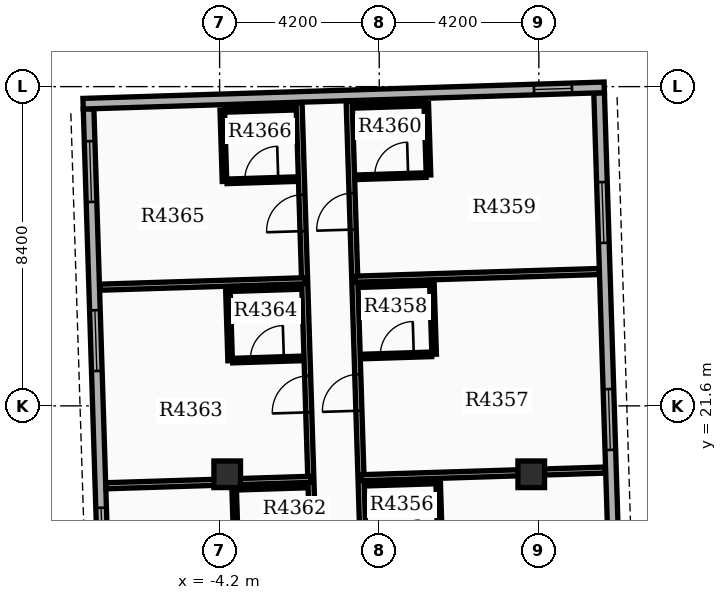
"""IFC4 building model, lengths in metres.
Left out: names, types, materials, properties, quantities, classifications, styles, units other than length and angle.
Written with IfcOpenShell. Run it as: python <this file> out.ifc"""

import sys

from ifc_helpers import new_model, si_unit, direction, frame, frame_2d, origin, origin_2d, place, context, subcontext, project, spatial, rectangle, extrude, element, fill, save


model = new_model("IFC4")
c1 = context("Model", 3, precision=1e-05, world=origin(), true_north=direction((0.0, 1.0)))
c2 = subcontext(c1, "Body", "Model", "MODEL_VIEW")
j1 = project(units=[si_unit("LENGTHUNIT", "METRE"), si_unit("PLANEANGLEUNIT", "RADIAN")], contexts=[c1])
p1 = place(None, origin())
s1 = spatial("IfcSite", under=j1, at=p1, CompositionType="ELEMENT")
p2 = place(p1, origin())
s2 = spatial("IfcBuilding", under=s1, at=p2, CompositionType="ELEMENT")
p3 = place(p2, frame((0.0, 0.0, 273.3)))
s3 = spatial("IfcBuildingStorey", under=s2, at=p3, CompositionType="ELEMENT", Elevation=273.3)
for number, where, z_axis, x_axis in (
    (1, (-4.0, 19.8, 0.0), (0.0, 0.0, 1.0), (1.0, 0.0, 0.0)),
    (2, (4.0, 19.8, 0.0), (0.0, 0.0, 1.0), (1.0, 0.0, 0.0)),
):
    element("IfcColumn", number, at=place(p3, frame(where, z_axis=z_axis, x_axis=x_axis)), inside=s3, PredefinedType="COLUMN", context=c2, shape_type="SweptSolid", body=[
        extrude(rectangle(XDim=0.7, YDim=0.7, at=origin_2d()), origin(), (0.0, 0.0, 1.0), 3.9),
    ])
p4 = place(p3, frame((6.247, 15.144, 0.0), z_axis=(0.0, 0.0, 1.0), x_axis=(-0.031406376864, 0.999506698073, 0.0)))
e3 = element("IfcWall", 3, at=p4, inside=s3, PredefinedType="STANDARD", context=c2, shape_type="SweptSolid", body=[
    extrude(rectangle(XDim=14.7, YDim=0.28, at=frame_2d((7.35, 0.0))), origin(), (0.0, 0.0, 1.0), 3.18),
])
p5 = place(p4, frame((0.85, 0.0, 0.8)))
e4 = element("IfcOpeningElement", 4, at=p5, cuts=e3, PredefinedType="OPENING", context=c2, shape_type="SweptSolid", body=[
    extrude(rectangle(XDim=1.6, YDim=1.7, at=frame_2d((0.8, 0.85))), frame((0.0, 0.15, 0.0), z_axis=(0.0, -1.0, 0.0), x_axis=(1.0, 0.0, 0.0)), (0.0, 0.0, 1.0), 0.3),
])
p6 = place(p4, frame((5.3, 0.0, 0.8)))
e5 = element("IfcOpeningElement", 5, at=p6, cuts=e3, PredefinedType="OPENING", context=c2, shape_type="SweptSolid", body=[
    extrude(rectangle(XDim=1.6, YDim=1.7, at=frame_2d((0.8, 0.85))), frame((0.0, 0.15, 0.0), z_axis=(0.0, -1.0, 0.0), x_axis=(1.0, 0.0, 0.0)), (0.0, 0.0, 1.0), 0.3),
])
p7 = place(p4, frame((10.75, 0.0, 0.8)))
e6 = element("IfcOpeningElement", 6, at=p7, cuts=e3, PredefinedType="OPENING", context=c2, shape_type="SweptSolid", body=[
    extrude(rectangle(XDim=1.6, YDim=1.7, at=frame_2d((0.8, 0.85))), frame((0.0, 0.15, 0.0), z_axis=(0.0, -1.0, 0.0), x_axis=(1.0, 0.0, 0.0)), (0.0, 0.0, 1.0), 0.3),
])
p8 = place(p3, frame((-7.648, 29.414, 0.0), z_axis=(0.0, 0.0, 1.0), x_axis=(0.031405855522, -0.999506714454, 0.0)))
e7 = element("IfcWall", 7, at=p8, inside=s3, PredefinedType="STANDARD", context=c2, shape_type="SweptSolid", body=[
    extrude(rectangle(XDim=14.7, YDim=0.28, at=frame_2d((7.35, 0.0))), origin(), (0.0, 0.0, 1.0), 3.18),
])
p9 = place(p8, frame((0.85, 0.0, 0.8)))
e8 = element("IfcOpeningElement", 8, at=p9, cuts=e7, PredefinedType="OPENING", context=c2, shape_type="SweptSolid", body=[
    extrude(rectangle(XDim=1.6, YDim=1.7, at=frame_2d((0.8, 0.85))), frame((0.0, 0.15, 0.0), z_axis=(0.0, -1.0, 0.0), x_axis=(1.0, 0.0, 0.0)), (0.0, 0.0, 1.0), 0.3),
])
p10 = place(p8, frame((5.3, 0.0, 0.8)))
e9 = element("IfcOpeningElement", 9, at=p10, cuts=e7, PredefinedType="OPENING", context=c2, shape_type="SweptSolid", body=[
    extrude(rectangle(XDim=1.6, YDim=1.7, at=frame_2d((0.8, 0.85))), frame((0.0, 0.15, 0.0), z_axis=(0.0, -1.0, 0.0), x_axis=(1.0, 0.0, 0.0)), (0.0, 0.0, 1.0), 0.3),
])
p11 = place(p8, frame((10.5, 0.0, 0.8)))
e10 = element("IfcOpeningElement", 10, at=p11, cuts=e7, PredefinedType="OPENING", context=c2, shape_type="SweptSolid", body=[
    extrude(rectangle(XDim=1.6, YDim=1.7, at=frame_2d((0.8, 0.85))), frame((0.0, 0.15, 0.0), z_axis=(0.0, -1.0, 0.0), x_axis=(1.0, 0.0, 0.0)), (0.0, 0.0, 1.0), 0.3),
])
p12 = place(p3, frame((5.921, 29.981, 0.0), z_axis=(0.0, 0.0, 1.0), x_axis=(-0.999506662003, -0.031407524763, 0.0)))
e11 = element("IfcWall", 11, at=p12, inside=s3, PredefinedType="STANDARD", context=c2, shape_type="SweptSolid", body=[
    extrude(rectangle(XDim=13.72, YDim=0.28, at=frame_2d((6.86, 0.0))), origin(), (0.0, 0.0, 1.0), 3.18),
])
p13 = place(p12, frame((0.85, 0.0, 0.85)))
e12 = element("IfcOpeningElement", 12, at=p13, cuts=e11, PredefinedType="OPENING", context=c2, shape_type="SweptSolid", body=[
    extrude(rectangle(XDim=1.0, YDim=1.5, at=frame_2d((0.5, 0.75))), frame((0.0, 0.15, 0.0), z_axis=(0.0, -1.0, 0.0), x_axis=(1.0, 0.0, 0.0)), (0.0, 0.0, 1.0), 0.3),
])
p14 = place(p3, frame((-0.319, 14.617, 0.0), z_axis=(0.0, 0.0, 1.0), x_axis=(-0.03142007044, 0.999506267701, 0.0)))
e13 = element("IfcWall", 13, at=p14, inside=s3, PredefinedType="PARTITIONING", context=c2, shape_type="SweptSolid", body=[
    extrude(rectangle(XDim=15.012, YDim=0.16, at=frame_2d((7.506, 0.0))), origin(), (0.0, 0.0, 1.0), 3.17),
])
p15 = place(p14, frame((1.122, 0.0, 0.0)))
e14 = element("IfcOpeningElement", 14, at=p15, cuts=e13, PredefinedType="OPENING", context=c2, shape_type="SweptSolid", body=[
    extrude(rectangle(XDim=0.96, YDim=2.15, at=frame_2d((0.48, 1.075))), frame((0.0, 0.09, 0.0), z_axis=(0.0, -1.0, 0.0), x_axis=(1.0, 0.0, 0.0)), (0.0, 0.0, 1.0), 0.18),
])
p16 = place(p14, frame((6.858, 0.0, 0.0)))
e15 = element("IfcOpeningElement", 15, at=p16, cuts=e13, PredefinedType="OPENING", context=c2, shape_type="SweptSolid", body=[
    extrude(rectangle(XDim=0.96, YDim=2.15, at=frame_2d((0.48, 1.075))), frame((0.0, 0.09, 0.0), z_axis=(0.0, -1.0, 0.0), x_axis=(1.0, 0.0, 0.0)), (0.0, 0.0, 1.0), 0.18),
])
p17 = place(p14, frame((11.628, 0.0, 0.0)))
e16 = element("IfcOpeningElement", 16, at=p17, cuts=e13, PredefinedType="OPENING", context=c2, shape_type="SweptSolid", body=[
    extrude(rectangle(XDim=0.96, YDim=2.15, at=frame_2d((0.48, 1.075))), frame((0.0, 0.09, 0.0), z_axis=(0.0, -1.0, 0.0), x_axis=(1.0, 0.0, 0.0)), (0.0, 0.0, 1.0), 0.18),
])
p18 = place(p3, frame((-0.479, 19.709, 0.0), z_axis=(0.0, 0.0, 1.0), x_axis=(0.999507175611, 0.031391175537, 0.0)))
e17 = element("IfcWall", 17, at=p18, inside=s3, PredefinedType="PARTITIONING", context=c2, shape_type="SweptSolid", body=[
    extrude(rectangle(XDim=6.432, YDim=0.16, at=frame_2d((3.216, 0.0))), origin(), (0.0, 0.0, 1.0), 3.17),
])
p19 = place(p3, frame((-0.334, 19.553, 0.0), z_axis=(0.0, 0.0, 1.0), x_axis=(0.999503004171, 0.03152371574, 0.0)))
e18 = element("IfcWall", 18, at=p19, inside=s3, PredefinedType="PARTITIONING", context=c2, shape_type="SweptSolid", body=[
    extrude(rectangle(XDim=1.82, YDim=0.12, at=frame_2d((0.91, 0.0))), origin(), (0.0, 0.0, 1.0), 3.17),
])
p20 = place(p3, frame((1.609, 17.733, 0.0), z_axis=(0.0, 0.0, 1.0), x_axis=(-0.031429371883, 0.999505975261, 0.0)))
e19 = element("IfcWall", 19, at=p20, inside=s3, PredefinedType="PARTITIONING", context=c2, shape_type="SweptSolid", body=[
    extrude(rectangle(XDim=1.88, YDim=0.12, at=frame_2d((0.94, 0.0))), origin(), (0.0, 0.0, 1.0), 3.17),
])
p21 = place(p3, frame((-0.644, 24.933, 0.0), z_axis=(0.0, 0.0, 1.0), x_axis=(0.99950602143, 0.031427903609, 0.0)))
e20 = element("IfcWall", 20, at=p21, inside=s3, PredefinedType="PARTITIONING", context=c2, shape_type="SweptSolid", body=[
    extrude(rectangle(XDim=6.432, YDim=0.16, at=frame_2d((3.216, 0.0))), origin(), (0.0, 0.0, 1.0), 3.17),
])
p22 = place(p3, frame((-0.439, 22.898, 0.0), z_axis=(0.0, 0.0, 1.0), x_axis=(0.999503004171, 0.03152371574, 0.0)))
e21 = element("IfcWall", 21, at=p22, inside=s3, PredefinedType="PARTITIONING", context=c2, shape_type="SweptSolid", body=[
    extrude(rectangle(XDim=1.82, YDim=0.12, at=frame_2d((0.91, 0.0))), origin(), (0.0, 0.0, 1.0), 3.17),
])
p23 = place(p22, frame((0.47, 0.0, 0.0)))
e22 = element("IfcOpeningElement", 22, at=p23, cuts=e21, PredefinedType="OPENING", context=c2, shape_type="SweptSolid", body=[
    extrude(rectangle(XDim=0.88, YDim=2.1, at=frame_2d((0.44, 1.05))), frame((0.0, 0.07, 0.0), z_axis=(0.0, -1.0, 0.0), x_axis=(1.0, 0.0, 0.0)), (0.0, 0.0, 1.0), 0.14),
])
p24 = place(p3, frame((-0.499, 24.778, 0.0), z_axis=(0.0, 0.0, 1.0), x_axis=(0.999507221803, 0.031389704724, 0.0)))
e23 = element("IfcWall", 23, at=p24, inside=s3, PredefinedType="PARTITIONING", context=c2, shape_type="SweptSolid", body=[
    extrude(rectangle(XDim=1.82, YDim=0.12, at=frame_2d((0.91, 0.0))), origin(), (0.0, 0.0, 1.0), 3.17),
])
p25 = place(p3, frame((1.445, 22.958, 0.0), z_axis=(0.0, 0.0, 1.0), x_axis=(-0.031425292588, 0.999506103526, 0.0)))
e24 = element("IfcWall", 24, at=p25, inside=s3, PredefinedType="PARTITIONING", context=c2, shape_type="SweptSolid", body=[
    extrude(rectangle(XDim=1.88, YDim=0.12, at=frame_2d((0.94, 0.0))), origin(), (0.0, 0.0, 1.0), 3.17),
])
p26 = place(p3, frame((-0.588, 27.615, 0.0), z_axis=(0.0, 0.0, 1.0), x_axis=(0.999507221803, 0.031389704724, 0.0)))
e25 = element("IfcWall", 25, at=p26, inside=s3, PredefinedType="PARTITIONING", context=c2, shape_type="SweptSolid", body=[
    extrude(rectangle(XDim=1.82, YDim=0.12, at=frame_2d((0.91, 0.0))), origin(), (0.0, 0.0, 1.0), 3.17),
])
p27 = place(p26, frame((0.47, 0.0, 0.0)))
e26 = element("IfcOpeningElement", 26, at=p27, cuts=e25, PredefinedType="OPENING", context=c2, shape_type="SweptSolid", body=[
    extrude(rectangle(XDim=0.88, YDim=2.1, at=frame_2d((0.44, 1.05))), frame((0.0, 0.07, 0.0), z_axis=(0.0, -1.0, 0.0), x_axis=(1.0, 0.0, 0.0)), (0.0, 0.0, 1.0), 0.14),
])
p28 = place(p3, frame((-0.647, 29.494, 0.0), z_axis=(0.0, 0.0, 1.0), x_axis=(0.999503004171, 0.03152371574, 0.0)))
e27 = element("IfcWall", 27, at=p28, inside=s3, PredefinedType="PARTITIONING", context=c2, shape_type="SweptSolid", body=[
    extrude(rectangle(XDim=1.82, YDim=0.12, at=frame_2d((0.91, 0.0))), origin(), (0.0, 0.0, 1.0), 3.17),
])
p29 = place(p3, frame((1.296, 27.674, 0.0), z_axis=(0.0, 0.0, 1.0), x_axis=(-0.031425292588, 0.999506103526, 0.0)))
e28 = element("IfcWall", 28, at=p29, inside=s3, PredefinedType="PARTITIONING", context=c2, shape_type="SweptSolid", body=[
    extrude(rectangle(XDim=1.88, YDim=0.12, at=frame_2d((0.94, 0.0))), origin(), (0.0, 0.0, 1.0), 3.17),
])
p30 = place(p3, frame((-1.639, 14.576, 0.0), z_axis=(0.0, 0.0, 1.0), x_axis=(-0.031403823507, 0.999506778301, 0.0)))
e29 = element("IfcWall", 29, at=p30, inside=s3, PredefinedType="PARTITIONING", context=c2, shape_type="SweptSolid", body=[
    extrude(rectangle(XDim=15.012, YDim=0.16, at=frame_2d((7.506, 0.0))), origin(), (0.0, 0.0, 1.0), 3.17),
])
p31 = place(p30, frame((1.122, 0.0, 0.0)))
e30 = element("IfcOpeningElement", 30, at=p31, cuts=e29, PredefinedType="OPENING", context=c2, shape_type="SweptSolid", body=[
    extrude(rectangle(XDim=0.96, YDim=2.15, at=frame_2d((0.48, 1.075))), frame((0.0, 0.09, 0.0), z_axis=(0.0, -1.0, 0.0), x_axis=(1.0, 0.0, 0.0)), (0.0, 0.0, 1.0), 0.18),
])
p32 = place(p30, frame((6.858, 0.0, 0.0)))
e31 = element("IfcOpeningElement", 31, at=p32, cuts=e29, PredefinedType="OPENING", context=c2, shape_type="SweptSolid", body=[
    extrude(rectangle(XDim=0.96, YDim=2.15, at=frame_2d((0.48, 1.075))), frame((0.0, 0.09, 0.0), z_axis=(0.0, -1.0, 0.0), x_axis=(1.0, 0.0, 0.0)), (0.0, 0.0, 1.0), 0.18),
])
p33 = place(p30, frame((11.628, 0.0, 0.0)))
e32 = element("IfcOpeningElement", 32, at=p33, cuts=e29, PredefinedType="OPENING", context=c2, shape_type="SweptSolid", body=[
    extrude(rectangle(XDim=0.96, YDim=2.15, at=frame_2d((0.48, 1.075))), frame((0.0, 0.09, 0.0), z_axis=(0.0, -1.0, 0.0), x_axis=(1.0, 0.0, 0.0)), (0.0, 0.0, 1.0), 0.18),
])
p34 = place(p3, frame((-1.799, 19.667, 0.0), z_axis=(0.0, 0.0, 1.0), x_axis=(-0.999506183343, -0.03142275385, 0.0)))
e33 = element("IfcWall", 33, at=p34, inside=s3, PredefinedType="PARTITIONING", context=c2, shape_type="SweptSolid", body=[
    extrude(rectangle(XDim=5.392, YDim=0.16, at=frame_2d((2.696, 0.0))), origin(), (0.0, 0.0, 1.0), 3.17),
])
p35 = place(p3, frame((-3.753, 19.446, 0.0), z_axis=(0.0, 0.0, 1.0), x_axis=(0.999507221803, 0.031389704724, 0.0)))
e34 = element("IfcWall", 34, at=p35, inside=s3, PredefinedType="PARTITIONING", context=c2, shape_type="SweptSolid", body=[
    extrude(rectangle(XDim=1.82, YDim=0.12, at=frame_2d((0.91, 0.0))), origin(), (0.0, 0.0, 1.0), 3.17),
])
p36 = place(p3, frame((-3.759, 17.565, 0.0), z_axis=(0.0, 0.0, 1.0), x_axis=(-0.031429371883, 0.999505975261, 0.0)))
e35 = element("IfcWall", 35, at=p36, inside=s3, PredefinedType="PARTITIONING", context=c2, shape_type="SweptSolid", body=[
    extrude(rectangle(XDim=1.88, YDim=0.12, at=frame_2d((0.94, 0.0))), origin(), (0.0, 0.0, 1.0), 3.17),
])
p37 = place(p3, frame((-1.963, 24.892, 0.0), z_axis=(0.0, 0.0, 1.0), x_axis=(-0.999506183343, -0.03142275385, 0.0)))
e36 = element("IfcWall", 36, at=p37, inside=s3, PredefinedType="PARTITIONING", context=c2, shape_type="SweptSolid", body=[
    extrude(rectangle(XDim=5.392, YDim=0.16, at=frame_2d((2.696, 0.0))), origin(), (0.0, 0.0, 1.0), 3.17),
])
p38 = place(p3, frame((-3.858, 22.791, 0.0), z_axis=(0.0, 0.0, 1.0), x_axis=(0.999507221803, 0.031389704724, 0.0)))
e37 = element("IfcWall", 37, at=p38, inside=s3, PredefinedType="PARTITIONING", context=c2, shape_type="SweptSolid", body=[
    extrude(rectangle(XDim=1.82, YDim=0.12, at=frame_2d((0.91, 0.0))), origin(), (0.0, 0.0, 1.0), 3.17),
])
p39 = place(p38, frame((0.47, 0.0, 0.0)))
e38 = element("IfcOpeningElement", 38, at=p39, cuts=e37, PredefinedType="OPENING", context=c2, shape_type="SweptSolid", body=[
    extrude(rectangle(XDim=0.88, YDim=2.1, at=frame_2d((0.44, 1.05))), frame((0.0, 0.07, 0.0), z_axis=(0.0, -1.0, 0.0), x_axis=(1.0, 0.0, 0.0)), (0.0, 0.0, 1.0), 0.14),
])
p40 = place(p3, frame((-3.917, 24.67, 0.0), z_axis=(0.0, 0.0, 1.0), x_axis=(0.999507221803, 0.031389704724, 0.0)))
e39 = element("IfcWall", 39, at=p40, inside=s3, PredefinedType="PARTITIONING", context=c2, shape_type="SweptSolid", body=[
    extrude(rectangle(XDim=1.82, YDim=0.12, at=frame_2d((0.91, 0.0))), origin(), (0.0, 0.0, 1.0), 3.17),
])
p41 = place(p3, frame((-3.923, 22.789, 0.0), z_axis=(0.0, 0.0, 1.0), x_axis=(-0.031295563454, 0.999510173889, 0.0)))
e40 = element("IfcWall", 40, at=p41, inside=s3, PredefinedType="PARTITIONING", context=c2, shape_type="SweptSolid", body=[
    extrude(rectangle(XDim=1.88, YDim=0.12, at=frame_2d((0.94, 0.0))), origin(), (0.0, 0.0, 1.0), 3.17),
])
p42 = place(p3, frame((-4.006, 27.508, 0.0), z_axis=(0.0, 0.0, 1.0), x_axis=(0.999507221803, 0.031389704724, 0.0)))
e41 = element("IfcWall", 41, at=p42, inside=s3, PredefinedType="PARTITIONING", context=c2, shape_type="SweptSolid", body=[
    extrude(rectangle(XDim=1.82, YDim=0.12, at=frame_2d((0.91, 0.0))), origin(), (0.0, 0.0, 1.0), 3.17),
])
p43 = place(p42, frame((0.47, 0.0, 0.0)))
e42 = element("IfcOpeningElement", 42, at=p43, cuts=e41, PredefinedType="OPENING", context=c2, shape_type="SweptSolid", body=[
    extrude(rectangle(XDim=0.88, YDim=2.1, at=frame_2d((0.44, 1.05))), frame((0.0, 0.07, 0.0), z_axis=(0.0, -1.0, 0.0), x_axis=(1.0, 0.0, 0.0)), (0.0, 0.0, 1.0), 0.14),
])
p44 = place(p3, frame((-4.065, 29.387, 0.0), z_axis=(0.0, 0.0, 1.0), x_axis=(0.999503004171, 0.03152371574, 0.0)))
e43 = element("IfcWall", 43, at=p44, inside=s3, PredefinedType="PARTITIONING", context=c2, shape_type="SweptSolid", body=[
    extrude(rectangle(XDim=1.82, YDim=0.12, at=frame_2d((0.91, 0.0))), origin(), (0.0, 0.0, 1.0), 3.17),
])
p45 = place(p3, frame((-4.071, 27.506, 0.0), z_axis=(0.0, 0.0, 1.0), x_axis=(-0.031295563454, 0.999510173889, 0.0)))
e44 = element("IfcWall", 44, at=p45, inside=s3, PredefinedType="PARTITIONING", context=c2, shape_type="SweptSolid", body=[
    extrude(rectangle(XDim=1.88, YDim=0.12, at=frame_2d((0.94, 0.0))), origin(), (0.0, 0.0, 1.0), 3.17),
])
p46 = place(p6, origin())
e45 = element("IfcWindow", 45, at=p46, inside=s3, PartitioningType="SINGLE_PANEL", PredefinedType="WINDOW", context=c2, shape_type="SweptSolid", body=[
    extrude(rectangle(XDim=1.6, YDim=1.7, at=frame_2d((0.8, 0.85))), frame((0.0, 0.03, 0.0), z_axis=(0.0, -1.0, 0.0), x_axis=(1.0, 0.0, 0.0)), (0.0, 0.0, 1.0), 0.06),
])
fill(e5, e45)
p47 = place(p7, origin())
e46 = element("IfcWindow", 46, at=p47, inside=s3, PartitioningType="SINGLE_PANEL", PredefinedType="WINDOW", context=c2, shape_type="SweptSolid", body=[
    extrude(rectangle(XDim=1.6, YDim=1.7, at=frame_2d((0.8, 0.85))), frame((0.0, 0.03, 0.0), z_axis=(0.0, -1.0, 0.0), x_axis=(1.0, 0.0, 0.0)), (0.0, 0.0, 1.0), 0.06),
])
fill(e6, e46)
p48 = place(p9, origin())
e47 = element("IfcWindow", 47, at=p48, inside=s3, PartitioningType="SINGLE_PANEL", PredefinedType="WINDOW", context=c2, shape_type="SweptSolid", body=[
    extrude(rectangle(XDim=1.6, YDim=1.7, at=frame_2d((0.8, 0.85))), frame((0.0, 0.03, 0.0), z_axis=(0.0, -1.0, 0.0), x_axis=(1.0, 0.0, 0.0)), (0.0, 0.0, 1.0), 0.06),
])
fill(e8, e47)
p49 = place(p10, origin())
e48 = element("IfcWindow", 48, at=p49, inside=s3, PartitioningType="SINGLE_PANEL", PredefinedType="WINDOW", context=c2, shape_type="SweptSolid", body=[
    extrude(rectangle(XDim=1.6, YDim=1.7, at=frame_2d((0.8, 0.85))), frame((0.0, 0.03, 0.0), z_axis=(0.0, -1.0, 0.0), x_axis=(1.0, 0.0, 0.0)), (0.0, 0.0, 1.0), 0.06),
])
fill(e9, e48)
p50 = place(p11, origin())
e49 = element("IfcWindow", 49, at=p50, inside=s3, PartitioningType="SINGLE_PANEL", PredefinedType="WINDOW", context=c2, shape_type="SweptSolid", body=[
    extrude(rectangle(XDim=1.6, YDim=1.7, at=frame_2d((0.8, 0.85))), frame((0.0, 0.03, 0.0), z_axis=(0.0, -1.0, 0.0), x_axis=(1.0, 0.0, 0.0)), (0.0, 0.0, 1.0), 0.06),
])
fill(e10, e49)
p51 = place(p13, origin())
e50 = element("IfcWindow", 50, at=p51, inside=s3, PartitioningType="SINGLE_PANEL", PredefinedType="WINDOW", context=c2, shape_type="SweptSolid", body=[
    extrude(rectangle(XDim=1.0, YDim=1.5, at=frame_2d((0.5, 0.75))), frame((0.0, 0.03, 0.0), z_axis=(0.0, -1.0, 0.0), x_axis=(1.0, 0.0, 0.0)), (0.0, 0.0, 1.0), 0.06),
])
fill(e12, e50)
p52 = place(p16, origin())
e51 = element("IfcDoor", 51, at=p52, inside=s3, OperationType="SINGLE_SWING_LEFT", PredefinedType="DOOR", context=c2, shape_type="SweptSolid", body=[
    extrude(rectangle(XDim=0.96, YDim=2.15, at=frame_2d((0.48, 1.075))), frame((0.0, 0.025, 0.0), z_axis=(0.0, -1.0, 0.0), x_axis=(1.0, 0.0, 0.0)), (0.0, 0.0, 1.0), 0.05),
])
fill(e15, e51)
p53 = place(p23, origin())
e52 = element("IfcDoor", 52, at=p53, inside=s3, OperationType="SINGLE_SWING_RIGHT", PredefinedType="DOOR", context=c2, shape_type="SweptSolid", body=[
    extrude(rectangle(XDim=0.88, YDim=2.1, at=frame_2d((0.44, 1.05))), frame((0.0, 0.025, 0.0), z_axis=(0.0, -1.0, 0.0), x_axis=(1.0, 0.0, 0.0)), (0.0, 0.0, 1.0), 0.05),
])
fill(e22, e52)
p54 = place(p17, origin())
e53 = element("IfcDoor", 53, at=p54, inside=s3, OperationType="SINGLE_SWING_LEFT", PredefinedType="DOOR", context=c2, shape_type="SweptSolid", body=[
    extrude(rectangle(XDim=0.96, YDim=2.15, at=frame_2d((0.48, 1.075))), frame((0.0, 0.025, 0.0), z_axis=(0.0, -1.0, 0.0), x_axis=(1.0, 0.0, 0.0)), (0.0, 0.0, 1.0), 0.05),
])
fill(e16, e53)
p55 = place(p27, origin())
e54 = element("IfcDoor", 54, at=p55, inside=s3, OperationType="SINGLE_SWING_RIGHT", PredefinedType="DOOR", context=c2, shape_type="SweptSolid", body=[
    extrude(rectangle(XDim=0.88, YDim=2.1, at=frame_2d((0.44, 1.05))), frame((0.0, 0.025, 0.0), z_axis=(0.0, -1.0, 0.0), x_axis=(1.0, 0.0, 0.0)), (0.0, 0.0, 1.0), 0.05),
])
fill(e26, e54)
p56 = place(p32, origin())
e55 = element("IfcDoor", 55, at=p56, inside=s3, OperationType="SINGLE_SWING_LEFT", PredefinedType="DOOR", context=c2, shape_type="SweptSolid", body=[
    extrude(rectangle(XDim=0.96, YDim=2.15, at=frame_2d((0.48, 1.075))), frame((0.0, 0.025, 0.0), z_axis=(0.0, -1.0, 0.0), x_axis=(1.0, 0.0, 0.0)), (0.0, 0.0, 1.0), 0.05),
])
fill(e31, e55)
p57 = place(p39, origin())
e56 = element("IfcDoor", 56, at=p57, inside=s3, OperationType="SINGLE_SWING_RIGHT", PredefinedType="DOOR", context=c2, shape_type="SweptSolid", body=[
    extrude(rectangle(XDim=0.88, YDim=2.1, at=frame_2d((0.44, 1.05))), frame((0.0, 0.025, 0.0), z_axis=(0.0, -1.0, 0.0), x_axis=(1.0, 0.0, 0.0)), (0.0, 0.0, 1.0), 0.05),
])
fill(e38, e56)
p58 = place(p33, origin())
e57 = element("IfcDoor", 57, at=p58, inside=s3, OperationType="SINGLE_SWING_LEFT", PredefinedType="DOOR", context=c2, shape_type="SweptSolid", body=[
    extrude(rectangle(XDim=0.96, YDim=2.15, at=frame_2d((0.48, 1.075))), frame((0.0, 0.025, 0.0), z_axis=(0.0, -1.0, 0.0), x_axis=(1.0, 0.0, 0.0)), (0.0, 0.0, 1.0), 0.05),
])
fill(e32, e57)
p59 = place(p43, origin())
e58 = element("IfcDoor", 58, at=p59, inside=s3, OperationType="SINGLE_SWING_RIGHT", PredefinedType="DOOR", context=c2, shape_type="SweptSolid", body=[
    extrude(rectangle(XDim=0.88, YDim=2.1, at=frame_2d((0.44, 1.05))), frame((0.0, 0.025, 0.0), z_axis=(0.0, -1.0, 0.0), x_axis=(1.0, 0.0, 0.0)), (0.0, 0.0, 1.0), 0.05),
])
fill(e42, e58)
save(model, sys.argv[1])
